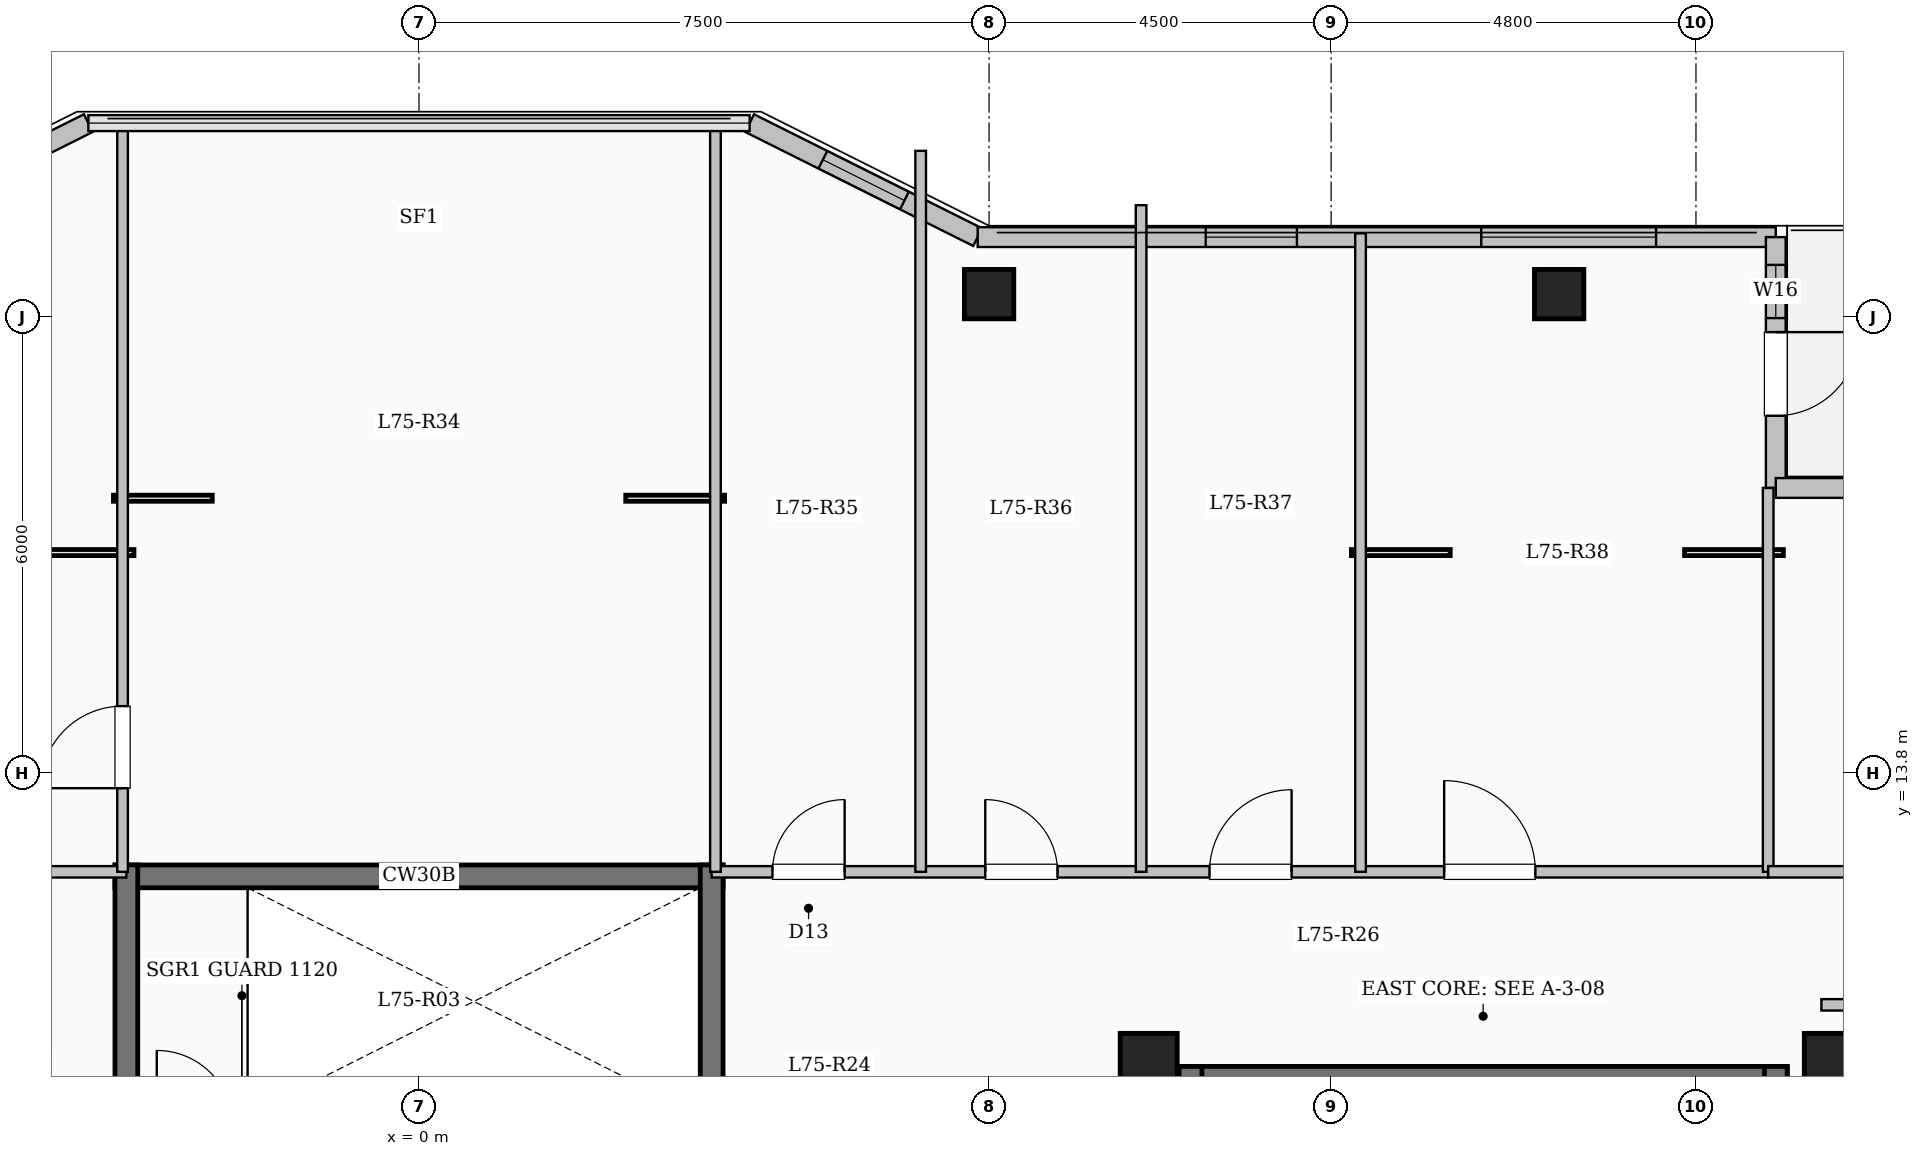
"""IFC4 building model, lengths in metres.
Left out: names, types, materials, properties, quantities, classifications, styles, units other than length and angle.
Written with IfcOpenShell. Run it as: python <this file> out.ifc"""

import sys

from ifc_helpers import new_model, si_unit, direction, frame, frame_2d, origin, origin_2d, place, context, subcontext, project, spatial, rectangle, extrude, element, fill, save


model = new_model("IFC4")
c1 = context("Model", 3, precision=1e-05, world=origin(), true_north=direction((0.0, 1.0)))
c2 = subcontext(c1, "Body", "Model", "MODEL_VIEW")
j1 = project(units=[si_unit("LENGTHUNIT", "METRE"), si_unit("PLANEANGLEUNIT", "RADIAN")], contexts=[c1])
p1 = place(None, origin())
s1 = spatial("IfcSite", under=j1, at=p1, CompositionType="ELEMENT")
p2 = place(p1, origin())
s2 = spatial("IfcBuilding", under=s1, at=p2, CompositionType="ELEMENT")
p3 = place(p2, frame((0.0, 0.0, 276.3)))
s3 = spatial("IfcBuildingStorey", under=s2, at=p3, CompositionType="ELEMENT", Elevation=276.3)
for number, where, z_axis, x_axis in (
    (1, (9.6, 10.0, 0.0), (0.0, 0.0, 1.0), (1.0, 0.0, 0.0)),
    (2, (18.6, 10.0, 0.0), (0.0, 0.0, 1.0), (1.0, 0.0, 0.0)),
):
    element("IfcColumn", number, at=place(p3, frame(where, z_axis=z_axis, x_axis=x_axis)), inside=s3, PredefinedType="COLUMN", context=c2, shape_type="SweptSolid", body=[
        extrude(rectangle(XDim=0.75, YDim=0.75, at=origin_2d()), origin(), (0.0, 0.0, 1.0), 5.25),
    ])
for number, where, z_axis, x_axis in (
    (3, (7.5, 20.1, 0.0), (0.0, 0.0, 1.0), (1.0, 0.0, 0.0)),
    (4, (15.0, 20.1, 0.0), (0.0, 0.0, 1.0), (1.0, 0.0, 0.0)),
):
    element("IfcColumn", number, at=place(p3, frame(where, z_axis=z_axis, x_axis=x_axis)), inside=s3, PredefinedType="COLUMN", context=c2, shape_type="SweptSolid", body=[
        extrude(rectangle(XDim=0.65, YDim=0.65, at=origin_2d()), origin(), (0.0, 0.0, 1.0), 5.25),
    ])
p4 = place(p3, frame((-7.35, 20.85, 0.0), z_axis=(0.0, 0.0, 1.0), x_axis=(0.894427191, 0.4472135955, 0.0)))
e5 = element("IfcWall", 5, at=p4, inside=s3, PredefinedType="SOLIDWALL", context=c2, shape_type="SweptSolid", body=[
    extrude(rectangle(XDim=3.354, YDim=0.26, at=frame_2d((1.677, 0.0))), origin(), (0.0, 0.0, 1.0), 4.95),
])
p5 = place(p4, frame((0.501, 0.0, 0.95)))
e6 = element("IfcOpeningElement", 6, at=p5, cuts=e5, PredefinedType="OPENING", context=c2, shape_type="SweptSolid", body=[
    extrude(rectangle(XDim=1.2, YDim=1.5, at=frame_2d((0.6, 0.75))), frame((0.0, 0.14, 0.0), z_axis=(0.0, -1.0, 0.0), x_axis=(1.0, 0.0, 0.0)), (0.0, 0.0, 1.0), 0.28),
])
p6 = place(p3, frame((4.35, 22.35, 0.0), z_axis=(0.0, 0.0, 1.0), x_axis=(0.894427191, -0.4472135955, 0.0)))
e7 = element("IfcWall", 7, at=p6, inside=s3, PredefinedType="SOLIDWALL", context=c2, shape_type="SweptSolid", body=[
    extrude(rectangle(XDim=3.354, YDim=0.26, at=frame_2d((1.677, 0.0))), origin(), (0.0, 0.0, 1.0), 4.95),
])
p7 = place(p6, frame((1.077, 0.0, 0.95)))
e8 = element("IfcOpeningElement", 8, at=p7, cuts=e7, PredefinedType="OPENING", context=c2, shape_type="SweptSolid", body=[
    extrude(rectangle(XDim=1.2, YDim=1.5, at=frame_2d((0.6, 0.75))), frame((0.0, 0.14, 0.0), z_axis=(0.0, -1.0, 0.0), x_axis=(1.0, 0.0, 0.0)), (0.0, 0.0, 1.0), 0.28),
])
p8 = place(p3, frame((7.35, 20.85, 0.0), z_axis=(0.0, 0.0, 1.0), x_axis=(1.0, 0.0, 0.0)))
e9 = element("IfcWall", 9, at=p8, inside=s3, PredefinedType="SOLIDWALL", context=c2, shape_type="SweptSolid", body=[
    extrude(rectangle(XDim=10.5, YDim=0.26, at=frame_2d((5.25, 0.0))), origin(), (0.0, 0.0, 1.0), 4.95),
])
p9 = place(p8, frame((3.0, 0.0, 0.95)))
e10 = element("IfcOpeningElement", 10, at=p9, cuts=e9, PredefinedType="OPENING", context=c2, shape_type="SweptSolid", body=[
    extrude(rectangle(XDim=1.2, YDim=1.5, at=frame_2d((0.6, 0.75))), frame((0.0, 0.14, 0.0), z_axis=(0.0, -1.0, 0.0), x_axis=(1.0, 0.0, 0.0)), (0.0, 0.0, 1.0), 0.28),
])
p10 = place(p8, frame((6.625, 0.0, 0.85)))
e11 = element("IfcOpeningElement", 11, at=p10, cuts=e9, PredefinedType="OPENING", context=c2, shape_type="SweptSolid", body=[
    extrude(rectangle(XDim=2.3, YDim=2.2, at=frame_2d((1.15, 1.1))), frame((0.0, 0.14, 0.0), z_axis=(0.0, -1.0, 0.0), x_axis=(1.0, 0.0, 0.0)), (0.0, 0.0, 1.0), 0.28),
])
p11 = place(p3, frame((17.85, 20.85, 0.0), z_axis=(0.0, 0.0, 1.0), x_axis=(0.0, -1.0, 0.0)))
e12 = element("IfcWall", 12, at=p11, inside=s3, PredefinedType="SOLIDWALL", context=c2, shape_type="SweptSolid", body=[
    extrude(rectangle(XDim=3.3, YDim=0.26, at=frame_2d((1.65, 0.0))), origin(), (0.0, 0.0, 1.0), 4.95),
])
p12 = place(p11, frame((1.25, 0.0, 0.0)))
e13 = element("IfcOpeningElement", 13, at=p12, cuts=e12, PredefinedType="OPENING", context=c2, shape_type="SweptSolid", body=[
    extrude(rectangle(XDim=1.1, YDim=2.2, at=frame_2d((0.55, 1.1))), frame((0.0, 0.14, 0.0), z_axis=(0.0, -1.0, 0.0), x_axis=(1.0, 0.0, 0.0)), (0.0, 0.0, 1.0), 0.28),
])
p13 = place(p11, frame((0.365, 0.0, 0.95)))
e14 = element("IfcOpeningElement", 14, at=p13, cuts=e12, PredefinedType="OPENING", context=c2, shape_type="SweptSolid", body=[
    extrude(rectangle(XDim=0.7, YDim=1.5, at=frame_2d((0.35, 0.75))), frame((0.0, 0.14, 0.0), z_axis=(0.0, -1.0, 0.0), x_axis=(1.0, 0.0, 0.0)), (0.0, 0.0, 1.0), 0.28),
])
p14 = place(p3, frame((17.85, 17.55, 0.0), z_axis=(0.0, 0.0, 1.0), x_axis=(1.0, 0.0, 0.0)))
e15 = element("IfcWall", 15, at=p14, inside=s3, PredefinedType="SOLIDWALL", context=c2, shape_type="SweptSolid", body=[
    extrude(rectangle(XDim=4.8, YDim=0.26, at=frame_2d((2.4, 0.0))), origin(), (0.0, 0.0, 1.0), 4.95),
])
p15 = place(p14, frame((1.225, 0.0, 0.85)))
e16 = element("IfcOpeningElement", 16, at=p15, cuts=e15, PredefinedType="OPENING", context=c2, shape_type="SweptSolid", body=[
    extrude(rectangle(XDim=2.3, YDim=2.2, at=frame_2d((1.15, 1.1))), frame((0.0, 0.14, 0.0), z_axis=(0.0, -1.0, 0.0), x_axis=(1.0, 0.0, 0.0)), (0.0, 0.0, 1.0), 0.28),
])
p16 = place(p3, frame((10.0, 9.79, 0.0), z_axis=(0.0, 0.0, 1.0), x_axis=(1.0, 0.0, 0.0)))
e17 = element("IfcWall", 17, at=p16, inside=s3, PredefinedType="SHEAR", context=c2, shape_type="SweptSolid", body=[
    extrude(rectangle(XDim=8.0, YDim=0.3, at=frame_2d((4.0, 0.0))), origin(), (0.0, 0.0, 1.0), 5.25),
])
for number, where, z_axis, x_axis in (
    (18, (10.15, 6.35, 0.0), (0.0, 0.0, 1.0), (0.0, 1.0, 0.0)),
    (19, (17.85, 6.35, 0.0), (0.0, 0.0, 1.0), (0.0, 1.0, 0.0)),
):
    element("IfcWall", number, at=place(p3, frame(where, z_axis=z_axis, x_axis=x_axis)), inside=s3, PredefinedType="SHEAR", context=c2, shape_type="SweptSolid", body=[
        extrude(rectangle(XDim=3.59, YDim=0.3, at=frame_2d((1.795, 0.0))), origin(), (0.0, 0.0, 1.0), 5.25),
    ])
p17 = place(p3, frame((-4.0, 12.44, 0.0), z_axis=(0.0, 0.0, 1.0), x_axis=(1.0, 0.0, 0.0)))
e20 = element("IfcWall", 20, at=p17, inside=s3, PredefinedType="SHEAR", context=c2, shape_type="SweptSolid", body=[
    extrude(rectangle(XDim=8.0, YDim=0.3, at=frame_2d((4.0, 0.0))), origin(), (0.0, 0.0, 1.0), 5.25),
])
for number, where, z_axis, x_axis in (
    (21, (-3.85, 9.0, 0.0), (0.0, 0.0, 1.0), (0.0, 1.0, 0.0)),
    (22, (3.85, 9.0, 0.0), (0.0, 0.0, 1.0), (0.0, 1.0, 0.0)),
):
    element("IfcWall", number, at=place(p3, frame(where, z_axis=z_axis, x_axis=x_axis)), inside=s3, PredefinedType="SHEAR", context=c2, shape_type="SweptSolid", body=[
        extrude(rectangle(XDim=3.59, YDim=0.3, at=frame_2d((1.795, 0.0))), origin(), (0.0, 0.0, 1.0), 5.25),
    ])
p18 = place(p3, frame((-17.75, 12.5, 0.0), z_axis=(0.0, 0.0, 1.0), x_axis=(1.0, 0.0, 0.0)))
e23 = element("IfcWall", 23, at=p18, inside=s3, PredefinedType="PARTITIONING", context=c2, shape_type="SweptSolid", body=[
    extrude(rectangle(XDim=13.9, YDim=0.15, at=frame_2d((6.95, 0.0))), origin(), (0.0, 0.0, 1.0), 4.95),
])
p19 = place(p18, frame((1.2, 0.0, 0.0)))
e24 = element("IfcOpeningElement", 24, at=p19, cuts=e23, PredefinedType="OPENING", context=c2, shape_type="SweptSolid", body=[
    extrude(rectangle(XDim=1.2, YDim=2.15, at=frame_2d((0.6, 1.075))), frame((0.0, 0.085, 0.0), z_axis=(0.0, -1.0, 0.0), x_axis=(1.0, 0.0, 0.0)), (0.0, 0.0, 1.0), 0.17),
])
p20 = place(p18, frame((8.552, 0.0, 0.0)))
e25 = element("IfcOpeningElement", 25, at=p20, cuts=e23, PredefinedType="OPENING", context=c2, shape_type="SweptSolid", body=[
    extrude(rectangle(XDim=1.08, YDim=2.15, at=frame_2d((0.54, 1.075))), frame((0.0, 0.085, 0.0), z_axis=(0.0, -1.0, 0.0), x_axis=(1.0, 0.0, 0.0)), (0.0, 0.0, 1.0), 0.17),
])
p21 = place(p3, frame((3.85, 12.5, 0.0), z_axis=(0.0, 0.0, 1.0), x_axis=(1.0, 0.0, 0.0)))
e26 = element("IfcWall", 26, at=p21, inside=s3, PredefinedType="PARTITIONING", context=c2, shape_type="SweptSolid", body=[
    extrude(rectangle(XDim=13.9, YDim=0.15, at=frame_2d((6.95, 0.0))), origin(), (0.0, 0.0, 1.0), 4.95),
])
p22 = place(p21, frame((0.8, 0.0, 0.0)))
e27 = element("IfcOpeningElement", 27, at=p22, cuts=e26, PredefinedType="OPENING", context=c2, shape_type="SweptSolid", body=[
    extrude(rectangle(XDim=0.95, YDim=2.15, at=frame_2d((0.475, 1.075))), frame((0.0, 0.085, 0.0), z_axis=(0.0, -1.0, 0.0), x_axis=(1.0, 0.0, 0.0)), (0.0, 0.0, 1.0), 0.17),
])
p23 = place(p21, frame((3.6, 0.0, 0.0)))
e28 = element("IfcOpeningElement", 28, at=p23, cuts=e26, PredefinedType="OPENING", context=c2, shape_type="SweptSolid", body=[
    extrude(rectangle(XDim=0.95, YDim=2.15, at=frame_2d((0.475, 1.075))), frame((0.0, 0.085, 0.0), z_axis=(0.0, -1.0, 0.0), x_axis=(1.0, 0.0, 0.0)), (0.0, 0.0, 1.0), 0.17),
])
p24 = place(p21, frame((6.55, 0.0, 0.0)))
e29 = element("IfcOpeningElement", 29, at=p24, cuts=e26, PredefinedType="OPENING", context=c2, shape_type="SweptSolid", body=[
    extrude(rectangle(XDim=1.08, YDim=2.15, at=frame_2d((0.54, 1.075))), frame((0.0, 0.085, 0.0), z_axis=(0.0, -1.0, 0.0), x_axis=(1.0, 0.0, 0.0)), (0.0, 0.0, 1.0), 0.17),
])
p25 = place(p21, frame((9.637, 0.0, 0.0)))
e30 = element("IfcOpeningElement", 30, at=p25, cuts=e26, PredefinedType="OPENING", context=c2, shape_type="SweptSolid", body=[
    extrude(rectangle(XDim=1.2, YDim=2.15, at=frame_2d((0.6, 1.075))), frame((0.0, 0.085, 0.0), z_axis=(0.0, -1.0, 0.0), x_axis=(1.0, 0.0, 0.0)), (0.0, 0.0, 1.0), 0.17),
])
p26 = place(p3, frame((-3.9, 12.5, 0.0), z_axis=(0.0, 0.0, 1.0), x_axis=(0.0, 1.0, 0.0)))
e31 = element("IfcWall", 31, at=p26, inside=s3, PredefinedType="PARTITIONING", context=c2, shape_type="SweptSolid", body=[
    extrude(rectangle(XDim=9.88, YDim=0.14, at=frame_2d((4.94, 0.0))), origin(), (0.0, 0.0, 1.0), 4.95),
])
p27 = place(p26, frame((1.1, 0.0, 0.0)))
e32 = element("IfcOpeningElement", 32, at=p27, cuts=e31, PredefinedType="OPENING", context=c2, shape_type="SweptSolid", body=[
    extrude(rectangle(XDim=1.08, YDim=2.15, at=frame_2d((0.54, 1.075))), frame((0.0, 0.08, 0.0), z_axis=(0.0, -1.0, 0.0), x_axis=(1.0, 0.0, 0.0)), (0.0, 0.0, 1.0), 0.16),
])
p28 = place(p3, frame((3.9, 12.5, 0.0), z_axis=(0.0, 0.0, 1.0), x_axis=(0.0, 1.0, 0.0)))
e33 = element("IfcWall", 33, at=p28, inside=s3, PredefinedType="PARTITIONING", context=c2, shape_type="SweptSolid", body=[
    extrude(rectangle(XDim=9.88, YDim=0.14, at=frame_2d((4.94, 0.0))), origin(), (0.0, 0.0, 1.0), 4.95),
])
p29 = place(p3, frame((6.6, 12.5, 0.0), z_axis=(0.0, 0.0, 1.0), x_axis=(0.0, 1.0, 0.0)))
e34 = element("IfcWall", 34, at=p29, inside=s3, PredefinedType="PARTITIONING", context=c2, shape_type="SweptSolid", body=[
    extrude(rectangle(XDim=9.485, YDim=0.14, at=frame_2d((4.743, 0.0))), origin(), (0.0, 0.0, 1.0), 4.95),
])
p30 = place(p3, frame((9.5, 12.5, 0.0), z_axis=(0.0, 0.0, 1.0), x_axis=(0.0, 1.0, 0.0)))
e35 = element("IfcWall", 35, at=p30, inside=s3, PredefinedType="PARTITIONING", context=c2, shape_type="SweptSolid", body=[
    extrude(rectangle(XDim=8.77, YDim=0.14, at=frame_2d((4.385, 0.0))), origin(), (0.0, 0.0, 1.0), 4.95),
])
p31 = place(p3, frame((12.387, 12.5, 0.0), z_axis=(0.0, 0.0, 1.0), x_axis=(0.0, 1.0, 0.0)))
e36 = element("IfcWall", 36, at=p31, inside=s3, PredefinedType="PARTITIONING", context=c2, shape_type="SweptSolid", body=[
    extrude(rectangle(XDim=8.4, YDim=0.14, at=frame_2d((4.2, 0.0))), origin(), (0.0, 0.0, 1.0), 4.95),
])
p32 = place(p3, frame((18.45, 10.75, 0.0), z_axis=(0.0, 0.0, 1.0), x_axis=(1.0, 0.0, 0.0)))
e37 = element("IfcWall", 37, at=p32, inside=s3, PredefinedType="PARTITIONING", context=c2, shape_type="SweptSolid", body=[
    extrude(rectangle(XDim=4.23, YDim=0.15, at=frame_2d((2.115, 0.0))), origin(), (0.0, 0.0, 1.0), 4.95),
])
p33 = place(p3, frame((17.75, 12.5, 0.0), z_axis=(0.0, 0.0, 1.0), x_axis=(0.0, 1.0, 0.0)))
e38 = element("IfcWall", 38, at=p33, inside=s3, PredefinedType="PARTITIONING", context=c2, shape_type="SweptSolid", body=[
    extrude(rectangle(XDim=5.05, YDim=0.14, at=frame_2d((2.525, 0.0))), origin(), (0.0, 0.0, 1.0), 4.95),
])
p34 = place(p3, frame((17.75, 12.5, 0.0), z_axis=(0.0, 0.0, 1.0), x_axis=(1.0, 0.0, 0.0)))
e39 = element("IfcWall", 39, at=p34, inside=s3, PredefinedType="PARTITIONING", context=c2, shape_type="SweptSolid", body=[
    extrude(rectangle(XDim=4.93, YDim=0.15, at=frame_2d((2.465, 0.0))), origin(), (0.0, 0.0, 1.0), 4.95),
])
p35 = place(p34, frame((1.99, 0.0, 0.0)))
e40 = element("IfcOpeningElement", 40, at=p35, cuts=e39, PredefinedType="OPENING", context=c2, shape_type="SweptSolid", body=[
    extrude(rectangle(XDim=0.95, YDim=2.15, at=frame_2d((0.475, 1.075))), frame((0.0, 0.085, 0.0), z_axis=(0.0, -1.0, 0.0), x_axis=(1.0, 0.0, 0.0)), (0.0, 0.0, 1.0), 0.17),
])
p36 = place(p7, origin())
e41 = element("IfcWindow", 41, at=p36, inside=s3, PartitioningType="SINGLE_PANEL", PredefinedType="WINDOW", context=c2, shape_type="SweptSolid", body=[
    extrude(rectangle(XDim=1.2, YDim=1.5, at=frame_2d((0.6, 0.75))), frame((0.0, 0.03, 0.0), z_axis=(0.0, -1.0, 0.0), x_axis=(1.0, 0.0, 0.0)), (0.0, 0.0, 1.0), 0.06),
])
fill(e8, e41)
p37 = place(p9, origin())
e42 = element("IfcWindow", 42, at=p37, inside=s3, PartitioningType="SINGLE_PANEL", PredefinedType="WINDOW", context=c2, shape_type="SweptSolid", body=[
    extrude(rectangle(XDim=1.2, YDim=1.5, at=frame_2d((0.6, 0.75))), frame((0.0, 0.03, 0.0), z_axis=(0.0, -1.0, 0.0), x_axis=(1.0, 0.0, 0.0)), (0.0, 0.0, 1.0), 0.06),
])
fill(e10, e42)
p38 = place(p10, origin())
e43 = element("IfcWindow", 43, at=p38, inside=s3, PartitioningType="SINGLE_PANEL", PredefinedType="WINDOW", context=c2, shape_type="SweptSolid", body=[
    extrude(rectangle(XDim=2.3, YDim=2.2, at=frame_2d((1.15, 1.1))), frame((0.0, 0.03, 0.0), z_axis=(0.0, -1.0, 0.0), x_axis=(1.0, 0.0, 0.0)), (0.0, 0.0, 1.0), 0.06),
])
fill(e11, e43)
p39 = place(p12, origin())
e44 = element("IfcDoor", 44, at=p39, inside=s3, OperationType="SINGLE_SWING_LEFT", PredefinedType="DOOR", context=c2, shape_type="SweptSolid", body=[
    extrude(rectangle(XDim=1.1, YDim=2.2, at=frame_2d((0.55, 1.1))), frame((0.0, 0.025, 0.0), z_axis=(0.0, -1.0, 0.0), x_axis=(1.0, 0.0, 0.0)), (0.0, 0.0, 1.0), 0.05),
])
fill(e13, e44)
p40 = place(p13, origin())
e45 = element("IfcWindow", 45, at=p40, inside=s3, PartitioningType="SINGLE_PANEL", PredefinedType="WINDOW", context=c2, shape_type="SweptSolid", body=[
    extrude(rectangle(XDim=0.7, YDim=1.5, at=frame_2d((0.35, 0.75))), frame((0.0, 0.03, 0.0), z_axis=(0.0, -1.0, 0.0), x_axis=(1.0, 0.0, 0.0)), (0.0, 0.0, 1.0), 0.06),
])
fill(e14, e45)
p41 = place(p27, origin())
e46 = element("IfcDoor", 46, at=p41, inside=s3, OperationType="SINGLE_SWING_LEFT", PredefinedType="DOOR", context=c2, shape_type="SweptSolid", body=[
    extrude(rectangle(XDim=1.08, YDim=2.15, at=frame_2d((0.54, 1.075))), frame((0.0, 0.025, 0.0), z_axis=(0.0, -1.0, 0.0), x_axis=(1.0, 0.0, 0.0)), (0.0, 0.0, 1.0), 0.05),
])
fill(e32, e46)
p42 = place(p22, origin())
e47 = element("IfcDoor", 47, at=p42, inside=s3, OperationType="SINGLE_SWING_RIGHT", PredefinedType="DOOR", context=c2, shape_type="SweptSolid", body=[
    extrude(rectangle(XDim=0.95, YDim=2.15, at=frame_2d((0.475, 1.075))), frame((0.0, 0.025, 0.0), z_axis=(0.0, -1.0, 0.0), x_axis=(1.0, 0.0, 0.0)), (0.0, 0.0, 1.0), 0.05),
])
fill(e27, e47)
p43 = place(p23, origin())
e48 = element("IfcDoor", 48, at=p43, inside=s3, OperationType="SINGLE_SWING_LEFT", PredefinedType="DOOR", context=c2, shape_type="SweptSolid", body=[
    extrude(rectangle(XDim=0.95, YDim=2.15, at=frame_2d((0.475, 1.075))), frame((0.0, 0.025, 0.0), z_axis=(0.0, -1.0, 0.0), x_axis=(1.0, 0.0, 0.0)), (0.0, 0.0, 1.0), 0.05),
])
fill(e28, e48)
p44 = place(p24, origin())
e49 = element("IfcDoor", 49, at=p44, inside=s3, OperationType="SINGLE_SWING_RIGHT", PredefinedType="DOOR", context=c2, shape_type="SweptSolid", body=[
    extrude(rectangle(XDim=1.08, YDim=2.15, at=frame_2d((0.54, 1.075))), frame((0.0, 0.025, 0.0), z_axis=(0.0, -1.0, 0.0), x_axis=(1.0, 0.0, 0.0)), (0.0, 0.0, 1.0), 0.05),
])
fill(e29, e49)
p45 = place(p25, origin())
e50 = element("IfcDoor", 50, at=p45, inside=s3, OperationType="SINGLE_SWING_LEFT", PredefinedType="DOOR", context=c2, shape_type="SweptSolid", body=[
    extrude(rectangle(XDim=1.2, YDim=2.15, at=frame_2d((0.6, 1.075))), frame((0.0, 0.025, 0.0), z_axis=(0.0, -1.0, 0.0), x_axis=(1.0, 0.0, 0.0)), (0.0, 0.0, 1.0), 0.05),
])
fill(e30, e50)
save(model, sys.argv[1])
